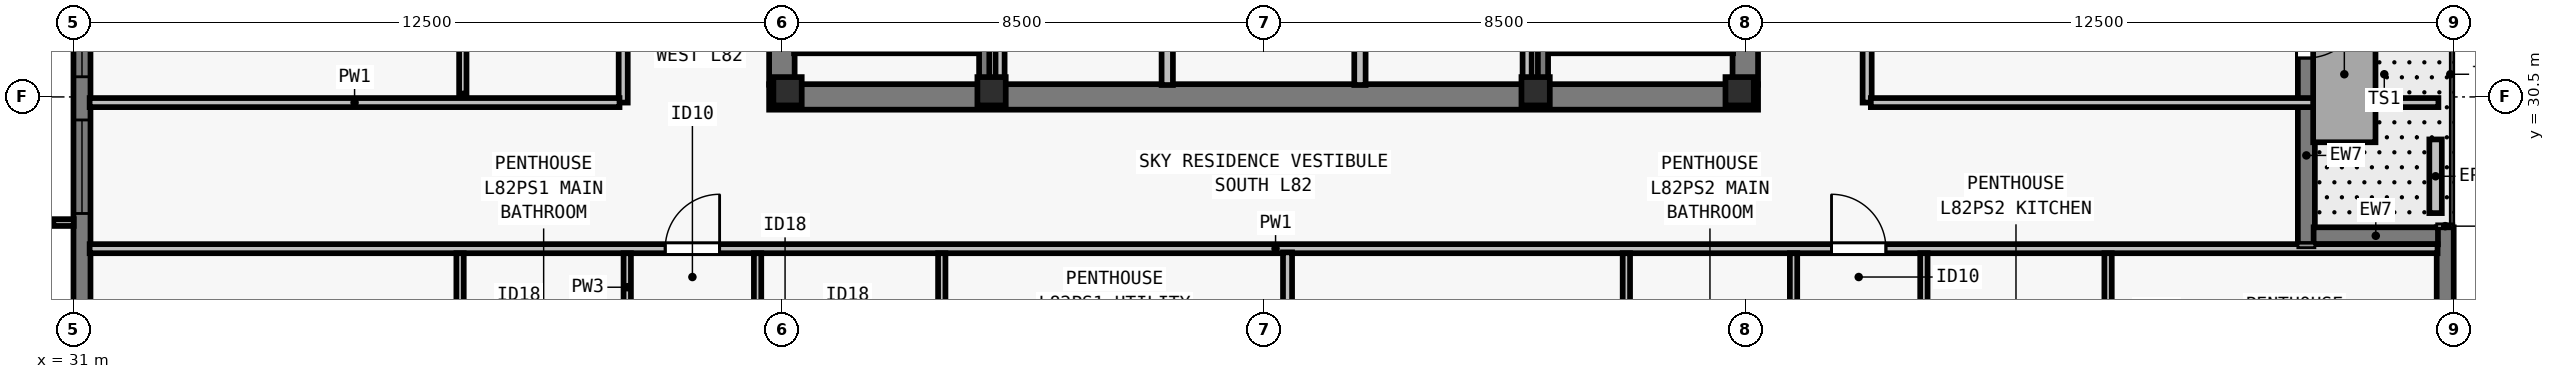
"""IFC4 building model, lengths in metres.
Left out: names, types, materials, properties, quantities, classifications, styles, units other than length and angle.
Written with IfcOpenShell. Run it as: python <this file> out.ifc"""

import sys

from ifc_helpers import new_model, si_unit, direction, frame, frame_2d, origin, origin_2d, place, context, subcontext, project, spatial, rectangle, i_section, extrude, element, fill, save


model = new_model("IFC4")
c1 = context("Model", 3, precision=1e-05, world=origin(), true_north=direction((0.0, 1.0)))
c2 = subcontext(c1, "Body", "Model", "MODEL_VIEW")
j1 = project(units=[si_unit("LENGTHUNIT", "METRE"), si_unit("PLANEANGLEUNIT", "RADIAN")], contexts=[c1])
p1 = place(None, origin())
s1 = spatial("IfcSite", under=j1, at=p1, CompositionType="ELEMENT")
p2 = place(p1, origin())
s2 = spatial("IfcBuilding", under=s1, at=p2, CompositionType="ELEMENT")
p3 = place(p2, frame((0.0, 0.0, 298.0)))
s3 = spatial("IfcBuildingStorey", under=s2, at=p3, CompositionType="ELEMENT", Elevation=298.0)
for number, where, z_axis, x_axis in (
    (1, (43.6, 30.6, 0.0), (0.0, 0.0, 1.0), (1.0, 0.0, 0.0)),
    (2, (47.2, 30.6, 0.0), (0.0, 0.0, 1.0), (1.0, 0.0, 0.0)),
    (3, (56.8, 30.6, 0.0), (0.0, 0.0, 1.0), (1.0, 0.0, 0.0)),
    (4, (60.4, 30.6, 0.0), (0.0, 0.0, 1.0), (1.0, 0.0, 0.0)),
):
    element("IfcColumn", number, at=place(p3, frame(where, z_axis=z_axis, x_axis=x_axis)), inside=s3, PredefinedType="COLUMN", context=c2, shape_type="SweptSolid", body=[
        extrude(i_section(OverallWidth=0.5, OverallDepth=0.5, WebThickness=0.028, FlangeThickness=0.045, at=origin_2d()), origin(), (0.0, 0.0, 1.0), 3.5),
    ])
p4 = place(p3, frame((72.85, 28.2, 0.0), z_axis=(0.0, 0.0, 1.0), x_axis=(0.0, -1.0, 0.0)))
e5 = element("IfcWall", 5, at=p4, inside=s3, PredefinedType="SOLIDWALL", context=c2, shape_type="SweptSolid", body=[
    extrude(rectangle(XDim=4.422, YDim=0.3, at=frame_2d((2.211, 0.0))), origin(), (0.0, 0.0, 1.0), 3.29),
])
p5 = place(p3, frame((31.15, 23.5, 0.0), z_axis=(0.0, 0.0, 1.0), x_axis=(0.0, 1.0, 0.0)))
e6 = element("IfcWall", 6, at=p5, inside=s3, PredefinedType="SOLIDWALL", context=c2, shape_type="SweptSolid", body=[
    extrude(rectangle(XDim=30.722, YDim=0.3, at=frame_2d((15.361, 0.0))), origin(), (0.0, 0.0, 1.0), 3.29),
])
p6 = place(p5, frame((4.944, 0.0, 0.8)))
e7 = element("IfcOpeningElement", 7, at=p6, cuts=e6, PredefinedType="OPENING", context=c2, shape_type="SweptSolid", body=[
    extrude(rectangle(XDim=1.65, YDim=1.758, at=frame_2d((0.825, 0.879))), frame((0.0, 0.16, 0.0), z_axis=(0.0, -1.0, 0.0), x_axis=(1.0, 0.0, 0.0)), (0.0, 0.0, 1.0), 0.32),
])
p7 = place(p5, frame((7.355, 0.0, 0.8)))
e8 = element("IfcOpeningElement", 8, at=p7, cuts=e6, PredefinedType="OPENING", context=c2, shape_type="SweptSolid", body=[
    extrude(rectangle(XDim=2.0, YDim=1.758, at=frame_2d((1.0, 0.879))), frame((0.0, 0.16, 0.0), z_axis=(0.0, -1.0, 0.0), x_axis=(1.0, 0.0, 0.0)), (0.0, 0.0, 1.0), 0.32),
])
p8 = place(p5, frame((12.617, 0.0, 0.8)))
e9 = element("IfcOpeningElement", 9, at=p8, cuts=e6, PredefinedType="OPENING", context=c2, shape_type="SweptSolid", body=[
    extrude(rectangle(XDim=1.65, YDim=1.758, at=frame_2d((0.825, 0.879))), frame((0.0, 0.16, 0.0), z_axis=(0.0, -1.0, 0.0), x_axis=(1.0, 0.0, 0.0)), (0.0, 0.0, 1.0), 0.32),
])
p9 = place(p5, frame((16.28, 0.0, 0.8)))
e10 = element("IfcOpeningElement", 10, at=p9, cuts=e6, PredefinedType="OPENING", context=c2, shape_type="SweptSolid", body=[
    extrude(rectangle(XDim=2.0, YDim=1.758, at=frame_2d((1.0, 0.879))), frame((0.0, 0.16, 0.0), z_axis=(0.0, -1.0, 0.0), x_axis=(1.0, 0.0, 0.0)), (0.0, 0.0, 1.0), 0.32),
])
p10 = place(p5, frame((21.142, 0.0, 0.8)))
e11 = element("IfcOpeningElement", 11, at=p10, cuts=e6, PredefinedType="OPENING", context=c2, shape_type="SweptSolid", body=[
    extrude(rectangle(XDim=1.65, YDim=1.758, at=frame_2d((0.825, 0.879))), frame((0.0, 0.16, 0.0), z_axis=(0.0, -1.0, 0.0), x_axis=(1.0, 0.0, 0.0)), (0.0, 0.0, 1.0), 0.32),
])
p11 = place(p5, frame((27.11, 0.0, 0.8)))
e12 = element("IfcOpeningElement", 12, at=p11, cuts=e6, PredefinedType="OPENING", context=c2, shape_type="SweptSolid", body=[
    extrude(rectangle(XDim=0.9, YDim=1.75, at=frame_2d((0.45, 0.875))), frame((0.0, 0.16, 0.0), z_axis=(0.0, -1.0, 0.0), x_axis=(1.0, 0.0, 0.0)), (0.0, 0.0, 1.0), 0.32),
])
p12 = place(p3, frame((70.4, 33.622, 0.0), z_axis=(0.0, 0.0, 1.0), x_axis=(0.0, -1.0, 0.0)))
e13 = element("IfcWall", 13, at=p12, inside=s3, PredefinedType="SOLIDWALL", context=c2, shape_type="SweptSolid", body=[
    extrude(rectangle(XDim=5.722, YDim=0.3, at=frame_2d((2.861, 0.0))), origin(), (0.0, 0.0, 1.0), 3.29),
])
p13 = place(p12, frame((1.436, 0.0, 0.0)))
e14 = element("IfcOpeningElement", 14, at=p13, cuts=e13, PredefinedType="OPENING", context=c2, shape_type="SweptSolid", body=[
    extrude(rectangle(XDim=1.0, YDim=2.15, at=frame_2d((0.5, 1.075))), frame((0.0, 0.16, 0.0), z_axis=(0.0, -1.0, 0.0), x_axis=(1.0, 0.0, 0.0)), (0.0, 0.0, 1.0), 0.32),
])
p14 = place(p3, frame((70.528, 28.05, 0.0), z_axis=(0.0, 0.0, 1.0), x_axis=(1.0, 0.0, 0.0)))
e15 = element("IfcWall", 15, at=p14, inside=s3, PredefinedType="SOLIDWALL", context=c2, shape_type="SweptSolid", body=[
    extrude(rectangle(XDim=2.194, YDim=0.3, at=frame_2d((1.097, 0.0))), origin(), (0.0, 0.0, 1.0), 3.29),
])
p15 = place(p3, frame((72.68, 28.45, 0.0), z_axis=(0.0, 0.0, 1.0), x_axis=(0.0, 1.0, 0.0)))
e16 = element("IfcWall", 16, at=p15, inside=s3, PredefinedType="PARAPET", context=c2, shape_type="SweptSolid", body=[
    extrude(rectangle(XDim=1.3, YDim=0.22, at=frame_2d((0.65, 0.0))), origin(), (0.0, 0.0, 1.0), 0.55),
])
p16 = place(p3, frame((43.275, 30.5, 0.0), z_axis=(0.0, 0.0, 1.0), x_axis=(1.0, 0.0, 0.0)))
e17 = element("IfcWall", 17, at=p16, inside=s3, PredefinedType="SHEAR", context=c2, shape_type="SweptSolid", body=[
    extrude(rectangle(XDim=17.45, YDim=0.45, at=frame_2d((8.725, 0.0))), origin(), (0.0, 0.0, 1.0), 3.29),
])
for number, where, z_axis, x_axis in (
    (18, (43.5, 30.715, 0.0), (0.0, 0.0, 1.0), (0.0, 1.0, 0.0)),
    (19, (60.5, 30.715, 0.0), (0.0, 0.0, 1.0), (0.0, 1.0, 0.0)),
):
    element("IfcWall", number, at=place(p3, frame(where, z_axis=z_axis, x_axis=x_axis)), inside=s3, PredefinedType="SHEAR", context=c2, shape_type="SweptSolid", body=[
        extrude(rectangle(XDim=8.035, YDim=0.45, at=frame_2d((4.018, 0.0))), origin(), (0.0, 0.0, 1.0), 3.29),
    ])
p17 = place(p3, frame((50.3, 30.71, 0.0), z_axis=(0.0, 0.0, 1.0), x_axis=(0.0, 1.0, 0.0)))
e20 = element("IfcWall", 20, at=p17, inside=s3, PredefinedType="SOLIDWALL", context=c2, shape_type="SweptSolid", body=[
    extrude(rectangle(XDim=7.905, YDim=0.2, at=frame_2d((3.953, 0.0))), origin(), (0.0, 0.0, 1.0), 3.29),
])
p18 = place(p17, frame((1.39, 0.0, 0.0)))
e21 = element("IfcOpeningElement", 21, at=p18, cuts=e20, PredefinedType="OPENING", context=c2, shape_type="SweptSolid", body=[
    extrude(rectangle(XDim=0.9, YDim=2.12, at=frame_2d((0.45, 1.06))), frame((0.0, 0.11, 0.0), z_axis=(0.0, -1.0, 0.0), x_axis=(1.0, 0.0, 0.0)), (0.0, 0.0, 1.0), 0.22),
])
p19 = place(p17, frame((5.39, 0.0, 0.0)))
e22 = element("IfcOpeningElement", 22, at=p19, cuts=e20, PredefinedType="OPENING", context=c2, shape_type="SweptSolid", body=[
    extrude(rectangle(XDim=0.9, YDim=2.12, at=frame_2d((0.45, 1.06))), frame((0.0, 0.11, 0.0), z_axis=(0.0, -1.0, 0.0), x_axis=(1.0, 0.0, 0.0)), (0.0, 0.0, 1.0), 0.22),
])
p20 = place(p3, frame((53.7, 30.71, 0.0), z_axis=(0.0, 0.0, 1.0), x_axis=(0.0, 1.0, 0.0)))
e23 = element("IfcWall", 23, at=p20, inside=s3, PredefinedType="SOLIDWALL", context=c2, shape_type="SweptSolid", body=[
    extrude(rectangle(XDim=7.905, YDim=0.2, at=frame_2d((3.953, 0.0))), origin(), (0.0, 0.0, 1.0), 3.29),
])
p21 = place(p20, frame((3.14, 0.0, 0.0)))
e24 = element("IfcOpeningElement", 24, at=p21, cuts=e23, PredefinedType="OPENING", context=c2, shape_type="SweptSolid", body=[
    extrude(rectangle(XDim=0.9, YDim=2.12, at=frame_2d((0.45, 1.06))), frame((0.0, 0.11, 0.0), z_axis=(0.0, -1.0, 0.0), x_axis=(1.0, 0.0, 0.0)), (0.0, 0.0, 1.0), 0.22),
])
for number, where, z_axis, x_axis in (
    (25, (47.35, 30.71, 0.0), (0.0, 0.0, 1.0), (0.0, 1.0, 0.0)),
    (26, (56.65, 30.71, 0.0), (0.0, 0.0, 1.0), (0.0, 1.0, 0.0)),
):
    element("IfcWall", number, at=place(p3, frame(where, z_axis=z_axis, x_axis=x_axis)), inside=s3, PredefinedType="PARTITIONING", context=c2, shape_type="SweptSolid", body=[
        extrude(rectangle(XDim=7.905, YDim=0.16, at=frame_2d((3.953, 0.0))), origin(), (0.0, 0.0, 1.0), 3.29),
    ])
p22 = place(p3, frame((31.285, 27.823, 0.0), z_axis=(0.0, 0.0, 1.0), x_axis=(1.0, 0.0, 0.0)))
e27 = element("IfcWall", 27, at=p22, inside=s3, PredefinedType="PARTITIONING", context=c2, shape_type="SweptSolid", body=[
    extrude(rectangle(XDim=41.43, YDim=0.16, at=frame_2d((20.715, 0.0))), origin(), (0.0, 0.0, 1.0), 3.009),
])
p23 = place(p22, frame((10.156, 0.0, 0.0)))
e28 = element("IfcOpeningElement", 28, at=p23, cuts=e27, PredefinedType="OPENING", context=c2, shape_type="SweptSolid", body=[
    extrude(rectangle(XDim=0.96, YDim=2.18, at=frame_2d((0.48, 1.09))), frame((0.0, 0.09, 0.0), z_axis=(0.0, -1.0, 0.0), x_axis=(1.0, 0.0, 0.0)), (0.0, 0.0, 1.0), 0.18),
])
p24 = place(p22, frame((30.736, 0.0, 0.0)))
e29 = element("IfcOpeningElement", 29, at=p24, cuts=e27, PredefinedType="OPENING", context=c2, shape_type="SweptSolid", body=[
    extrude(rectangle(XDim=0.96, YDim=2.18, at=frame_2d((0.48, 1.09))), frame((0.0, 0.09, 0.0), z_axis=(0.0, -1.0, 0.0), x_axis=(1.0, 0.0, 0.0)), (0.0, 0.0, 1.0), 0.18),
])
p25 = place(p3, frame((40.7, 30.4, 0.0), z_axis=(0.0, 0.0, 1.0), x_axis=(0.0, 1.0, 0.0)))
e30 = element("IfcWall", 30, at=p25, inside=s3, PredefinedType="PARTITIONING", context=c2, shape_type="SweptSolid", body=[
    extrude(rectangle(XDim=17.2, YDim=0.16, at=frame_2d((8.6, 0.0))), origin(), (0.0, 0.0, 1.0), 3.009),
])
p26 = place(p25, frame((3.82, 0.0, 0.0)))
e31 = element("IfcOpeningElement", 31, at=p26, cuts=e30, PredefinedType="OPENING", context=c2, shape_type="SweptSolid", body=[
    extrude(rectangle(XDim=0.96, YDim=2.18, at=frame_2d((0.48, 1.09))), frame((0.0, 0.09, 0.0), z_axis=(0.0, -1.0, 0.0), x_axis=(1.0, 0.0, 0.0)), (0.0, 0.0, 1.0), 0.18),
])
p27 = place(p25, frame((12.42, 0.0, 0.0)))
e32 = element("IfcOpeningElement", 32, at=p27, cuts=e30, PredefinedType="OPENING", context=c2, shape_type="SweptSolid", body=[
    extrude(rectangle(XDim=0.96, YDim=2.18, at=frame_2d((0.48, 1.09))), frame((0.0, 0.09, 0.0), z_axis=(0.0, -1.0, 0.0), x_axis=(1.0, 0.0, 0.0)), (0.0, 0.0, 1.0), 0.18),
])
p28 = place(p3, frame((62.65, 30.4, 0.0), z_axis=(0.0, 0.0, 1.0), x_axis=(0.0, 1.0, 0.0)))
e33 = element("IfcWall", 33, at=p28, inside=s3, PredefinedType="PARTITIONING", context=c2, shape_type="SweptSolid", body=[
    extrude(rectangle(XDim=17.2, YDim=0.16, at=frame_2d((8.6, 0.0))), origin(), (0.0, 0.0, 1.0), 3.29),
])
p29 = place(p28, frame((8.0, 0.0, 0.0)))
e34 = element("IfcOpeningElement", 34, at=p29, cuts=e33, PredefinedType="OPENING", context=c2, shape_type="SweptSolid", body=[
    extrude(rectangle(XDim=0.96, YDim=2.12, at=frame_2d((0.48, 1.06))), frame((0.0, 0.09, 0.0), z_axis=(0.0, -1.0, 0.0), x_axis=(1.0, 0.0, 0.0)), (0.0, 0.0, 1.0), 0.18),
])
p30 = place(p3, frame((31.285, 30.4, 0.0), z_axis=(0.0, 0.0, 1.0), x_axis=(1.0, 0.0, 0.0)))
e35 = element("IfcWall", 35, at=p30, inside=s3, PredefinedType="PARTITIONING", context=c2, shape_type="SweptSolid", body=[
    extrude(rectangle(XDim=9.35, YDim=0.16, at=frame_2d((4.675, 0.0))), origin(), (0.0, 0.0, 1.0), 3.29),
])
p31 = place(p3, frame((62.715, 30.4, 0.0), z_axis=(0.0, 0.0, 1.0), x_axis=(1.0, 0.0, 0.0)))
e36 = element("IfcWall", 36, at=p31, inside=s3, PredefinedType="PARTITIONING", context=c2, shape_type="SweptSolid", body=[
    extrude(rectangle(XDim=10.015, YDim=0.16, at=frame_2d((5.007, 0.0))), origin(), (0.0, 0.0, 1.0), 3.29),
])
p32 = place(p3, frame((37.821, 24.992, 0.0), z_axis=(0.0, 0.0, 1.0), x_axis=(0.0, 1.0, 0.0)))
e37 = element("IfcWall", 37, at=p32, inside=s3, PredefinedType="PLUMBINGWALL", context=c2, shape_type="SweptSolid", body=[
    extrude(rectangle(XDim=2.75, YDim=0.13, at=frame_2d((1.375, 0.0))), origin(), (0.0, 0.0, 1.0), 3.29),
])
p33 = place(p3, frame((40.771, 24.992, 0.0), z_axis=(0.0, 0.0, 1.0), x_axis=(0.0, 1.0, 0.0)))
e38 = element("IfcWall", 38, at=p33, inside=s3, PredefinedType="PLUMBINGWALL", context=c2, shape_type="SweptSolid", body=[
    extrude(rectangle(XDim=2.75, YDim=0.13, at=frame_2d((1.375, 0.0))), origin(), (0.0, 0.0, 1.0), 2.653),
])
p34 = place(p33, frame((0.55, 0.0, 0.0)))
e39 = element("IfcOpeningElement", 39, at=p34, cuts=e38, PredefinedType="OPENING", context=c2, shape_type="SweptSolid", body=[
    extrude(rectangle(XDim=0.85, YDim=2.08, at=frame_2d((0.425, 1.04))), frame((0.0, 0.075, 0.0), z_axis=(0.0, -1.0, 0.0), x_axis=(1.0, 0.0, 0.0)), (0.0, 0.0, 1.0), 0.15),
])
p35 = place(p3, frame((46.321, 24.992, 0.0), z_axis=(0.0, 0.0, 1.0), x_axis=(0.0, 1.0, 0.0)))
e40 = element("IfcWall", 40, at=p35, inside=s3, PredefinedType="PLUMBINGWALL", context=c2, shape_type="SweptSolid", body=[
    extrude(rectangle(XDim=2.75, YDim=0.13, at=frame_2d((1.375, 0.0))), origin(), (0.0, 0.0, 1.0), 3.29),
])
p36 = place(p3, frame((43.071, 24.992, 0.0), z_axis=(0.0, 0.0, 1.0), x_axis=(0.0, 1.0, 0.0)))
e41 = element("IfcWall", 41, at=p36, inside=s3, PredefinedType="PLUMBINGWALL", context=c2, shape_type="SweptSolid", body=[
    extrude(rectangle(XDim=2.75, YDim=0.13, at=frame_2d((1.375, 0.0))), origin(), (0.0, 0.0, 1.0), 3.29),
])
p37 = place(p36, frame((0.55, 0.0, 0.0)))
e42 = element("IfcOpeningElement", 42, at=p37, cuts=e41, PredefinedType="OPENING", context=c2, shape_type="SweptSolid", body=[
    extrude(rectangle(XDim=0.88, YDim=2.1, at=frame_2d((0.44, 1.05))), frame((0.0, 0.075, 0.0), z_axis=(0.0, -1.0, 0.0), x_axis=(1.0, 0.0, 0.0)), (0.0, 0.0, 1.0), 0.15),
])
p38 = place(p3, frame((52.423, 18.285, 0.0), z_axis=(0.0, 0.0, 1.0), x_axis=(0.0, 1.0, 0.0)))
e43 = element("IfcWall", 43, at=p38, inside=s3, PredefinedType="PARTITIONING", context=c2, shape_type="SweptSolid", body=[
    extrude(rectangle(XDim=9.473, YDim=0.16, at=frame_2d((4.736, 0.0))), origin(), (0.0, 0.0, 1.0), 3.009),
])
p39 = place(p3, frame((58.401, 24.992, 0.0), z_axis=(0.0, 0.0, 1.0), x_axis=(0.0, 1.0, 0.0)))
e44 = element("IfcWall", 44, at=p39, inside=s3, PredefinedType="PLUMBINGWALL", context=c2, shape_type="SweptSolid", body=[
    extrude(rectangle(XDim=2.75, YDim=0.13, at=frame_2d((1.375, 0.0))), origin(), (0.0, 0.0, 1.0), 3.29),
])
p40 = place(p3, frame((61.351, 24.992, 0.0), z_axis=(0.0, 0.0, 1.0), x_axis=(0.0, 1.0, 0.0)))
e45 = element("IfcWall", 45, at=p40, inside=s3, PredefinedType="PLUMBINGWALL", context=c2, shape_type="SweptSolid", body=[
    extrude(rectangle(XDim=2.75, YDim=0.13, at=frame_2d((1.375, 0.0))), origin(), (0.0, 0.0, 1.0), 3.29),
])
p41 = place(p40, frame((0.55, 0.0, 0.0)))
e46 = element("IfcOpeningElement", 46, at=p41, cuts=e45, PredefinedType="OPENING", context=c2, shape_type="SweptSolid", body=[
    extrude(rectangle(XDim=0.85, YDim=2.08, at=frame_2d((0.425, 1.04))), frame((0.0, 0.075, 0.0), z_axis=(0.0, -1.0, 0.0), x_axis=(1.0, 0.0, 0.0)), (0.0, 0.0, 1.0), 0.15),
])
p42 = place(p3, frame((66.901, 24.992, 0.0), z_axis=(0.0, 0.0, 1.0), x_axis=(0.0, 1.0, 0.0)))
e47 = element("IfcWall", 47, at=p42, inside=s3, PredefinedType="PLUMBINGWALL", context=c2, shape_type="SweptSolid", body=[
    extrude(rectangle(XDim=2.75, YDim=0.13, at=frame_2d((1.375, 0.0))), origin(), (0.0, 0.0, 1.0), 3.29),
])
p43 = place(p3, frame((63.651, 24.992, 0.0), z_axis=(0.0, 0.0, 1.0), x_axis=(0.0, 1.0, 0.0)))
e48 = element("IfcWall", 48, at=p43, inside=s3, PredefinedType="PLUMBINGWALL", context=c2, shape_type="SweptSolid", body=[
    extrude(rectangle(XDim=2.75, YDim=0.13, at=frame_2d((1.375, 0.0))), origin(), (0.0, 0.0, 1.0), 2.653),
])
p44 = place(p43, frame((0.55, 0.0, 0.0)))
e49 = element("IfcOpeningElement", 49, at=p44, cuts=e48, PredefinedType="OPENING", context=c2, shape_type="SweptSolid", body=[
    extrude(rectangle(XDim=0.88, YDim=2.1, at=frame_2d((0.44, 1.05))), frame((0.0, 0.075, 0.0), z_axis=(0.0, -1.0, 0.0), x_axis=(1.0, 0.0, 0.0)), (0.0, 0.0, 1.0), 0.15),
])
p45 = place(p3, frame((37.87, 30.56, 0.0), z_axis=(0.0, 0.0, 1.0), x_axis=(0.0, 1.0, 0.0)))
e50 = element("IfcWall", 50, at=p45, inside=s3, PredefinedType="PLUMBINGWALL", context=c2, shape_type="SweptSolid", body=[
    extrude(rectangle(XDim=2.94, YDim=0.13, at=frame_2d((1.47, 0.0))), origin(), (0.0, 0.0, 1.0), 3.29),
])
p46 = place(p3, frame((43.715, 31.36, 0.0), z_axis=(0.0, 0.0, 1.0), x_axis=(1.0, 0.0, 0.0)))
e51 = element("IfcWall", 51, at=p46, inside=s3, PredefinedType="SOLIDWALL", context=c2, shape_type="SweptSolid", body=[
    extrude(rectangle(XDim=3.28, YDim=0.18, at=frame_2d((1.64, 0.0))), origin(), (0.0, 0.0, 1.0), 3.29),
])
p47 = place(p3, frame((47.07, 38.78, 0.0), z_axis=(0.0, 0.0, 1.0), x_axis=(0.0, -1.0, 0.0)))
e52 = element("IfcWall", 52, at=p47, inside=s3, PredefinedType="SOLIDWALL", context=c2, shape_type="SweptSolid", body=[
    extrude(rectangle(XDim=8.067, YDim=0.18, at=frame_2d((4.034, 0.0))), origin(), (0.0, 0.0, 1.0), 3.29),
])
p48 = place(p3, frame((57.005, 31.36, 0.0), z_axis=(0.0, 0.0, 1.0), x_axis=(1.0, 0.0, 0.0)))
e53 = element("IfcWall", 53, at=p48, inside=s3, PredefinedType="SOLIDWALL", context=c2, shape_type="SweptSolid", body=[
    extrude(rectangle(XDim=3.28, YDim=0.18, at=frame_2d((1.64, 0.0))), origin(), (0.0, 0.0, 1.0), 3.29),
])
p49 = place(p3, frame((56.93, 38.78, 0.0), z_axis=(0.0, 0.0, 1.0), x_axis=(0.0, -1.0, 0.0)))
e54 = element("IfcWall", 54, at=p49, inside=s3, PredefinedType="SOLIDWALL", context=c2, shape_type="SweptSolid", body=[
    extrude(rectangle(XDim=8.067, YDim=0.18, at=frame_2d((4.034, 0.0))), origin(), (0.0, 0.0, 1.0), 3.29),
])
p50 = place(p6, origin())
e55 = element("IfcWindow", 55, at=p50, inside=s3, PartitioningType="SINGLE_PANEL", PredefinedType="WINDOW", context=c2, shape_type="SweptSolid", body=[
    extrude(rectangle(XDim=1.65, YDim=1.758, at=frame_2d((0.825, 0.879))), frame((0.0, -0.05, 0.0), z_axis=(0.0, -1.0, 0.0), x_axis=(1.0, 0.0, 0.0)), (0.0, 0.0, 1.0), 0.06),
])
fill(e7, e55)
p51 = place(p7, origin())
e56 = element("IfcWindow", 56, at=p51, inside=s3, PartitioningType="SINGLE_PANEL", PredefinedType="WINDOW", context=c2, shape_type="SweptSolid", body=[
    extrude(rectangle(XDim=2.0, YDim=1.758, at=frame_2d((1.0, 0.879))), frame((0.0, -0.05, 0.0), z_axis=(0.0, -1.0, 0.0), x_axis=(1.0, 0.0, 0.0)), (0.0, 0.0, 1.0), 0.06),
])
fill(e8, e56)
p52 = place(p13, origin())
e57 = element("IfcDoor", 57, at=p52, inside=s3, OperationType="SINGLE_SWING_LEFT", PredefinedType="DOOR", context=c2, shape_type="SweptSolid", body=[
    extrude(rectangle(XDim=1.0, YDim=2.15, at=frame_2d((0.5, 1.075))), frame((0.0, 0.025, 0.0), z_axis=(0.0, -1.0, 0.0), x_axis=(1.0, 0.0, 0.0)), (0.0, 0.0, 1.0), 0.05),
])
fill(e14, e57)
p53 = place(p23, origin())
e58 = element("IfcDoor", 58, at=p53, inside=s3, OperationType="SINGLE_SWING_RIGHT", PredefinedType="DOOR", context=c2, shape_type="SweptSolid", body=[
    extrude(rectangle(XDim=0.96, YDim=2.18, at=frame_2d((0.48, 1.09))), frame((0.0, 0.025, 0.0), z_axis=(0.0, -1.0, 0.0), x_axis=(1.0, 0.0, 0.0)), (0.0, 0.0, 1.0), 0.05),
])
fill(e28, e58)
p54 = place(p24, origin())
e59 = element("IfcDoor", 59, at=p54, inside=s3, OperationType="SINGLE_SWING_LEFT", PredefinedType="DOOR", context=c2, shape_type="SweptSolid", body=[
    extrude(rectangle(XDim=0.96, YDim=2.18, at=frame_2d((0.48, 1.09))), frame((0.0, 0.025, 0.0), z_axis=(0.0, -1.0, 0.0), x_axis=(1.0, 0.0, 0.0)), (0.0, 0.0, 1.0), 0.05),
])
fill(e29, e59)
save(model, sys.argv[1])
